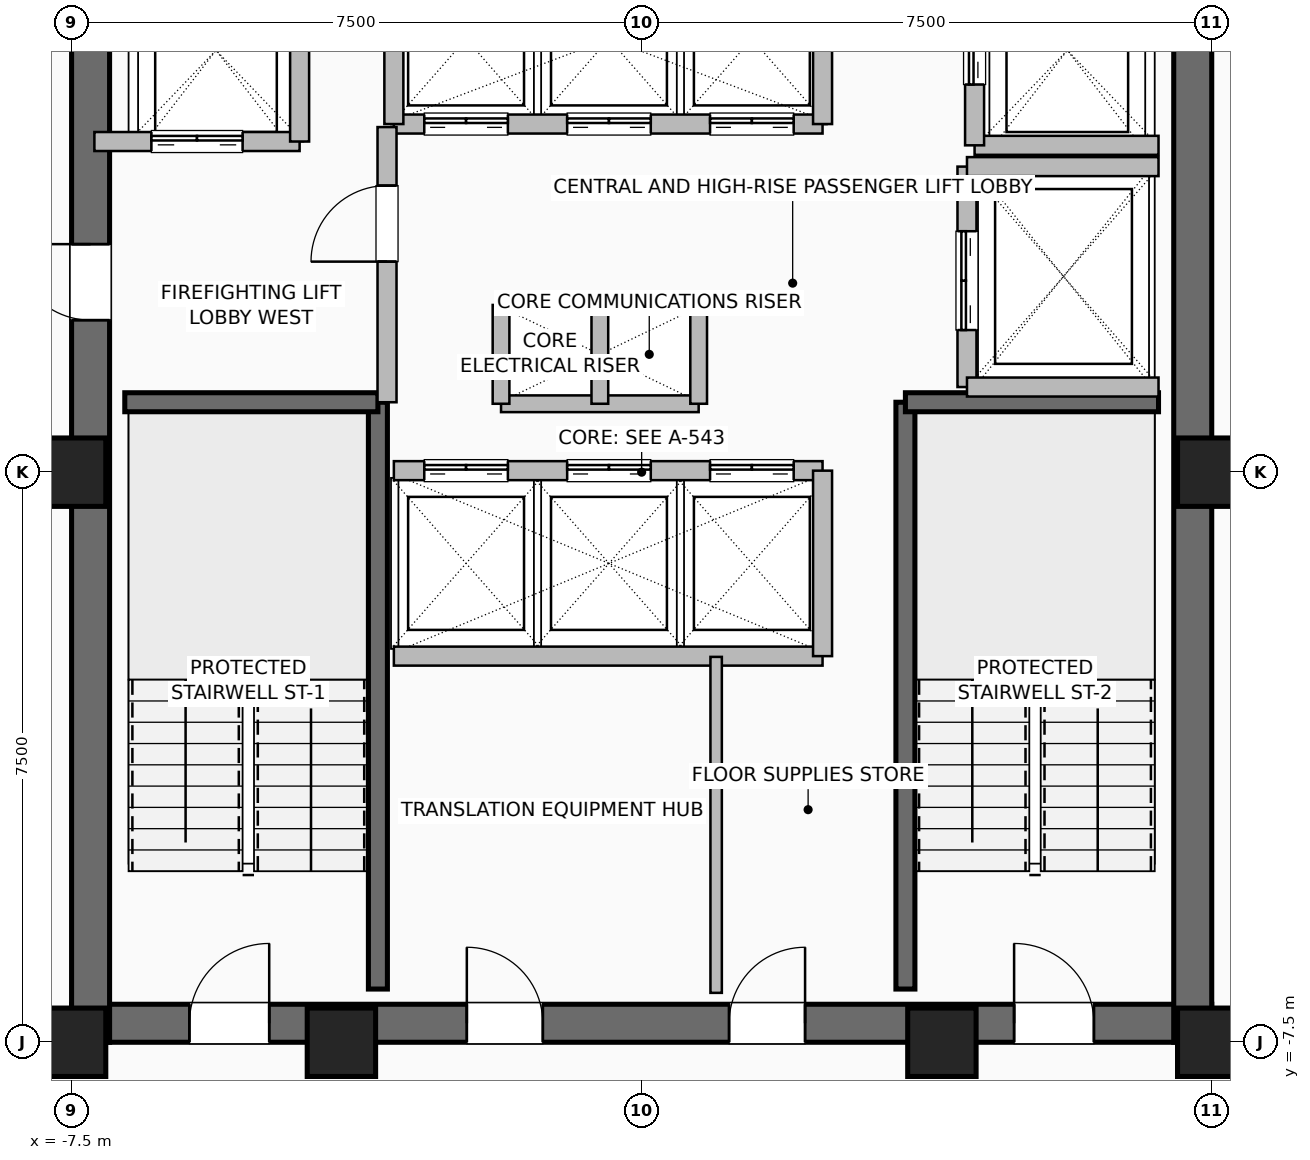
"""IFC4 building model, lengths in metres.
Left out: names, types, materials, properties, quantities, classifications, styles, units other than length and angle.
Written with IfcOpenShell. Run it as: python <this file> out.ifc"""

import sys

from ifc_helpers import new_model, si_unit, direction, frame, frame_2d, origin, origin_2d, place, context, subcontext, project, spatial, rectangle, hollow_rectangle, extrude, element, fill, save


model = new_model("IFC4")
c1 = context("Model", 3, precision=1e-05, world=origin(), true_north=direction((0.0, 1.0)))
c2 = subcontext(c1, "Body", "Model", "MODEL_VIEW")
j1 = project(units=[si_unit("LENGTHUNIT", "METRE"), si_unit("PLANEANGLEUNIT", "RADIAN")], contexts=[c1])
p1 = place(None, origin())
s1 = spatial("IfcSite", under=j1, at=p1, CompositionType="ELEMENT")
p2 = place(p1, origin())
s2 = spatial("IfcBuilding", under=s1, at=p2, CompositionType="ELEMENT")
p3 = place(p2, frame((0.0, 0.0, 166.2)))
s3 = spatial("IfcBuildingStorey", under=s2, at=p3, CompositionType="ELEMENT", Elevation=166.2)
for number, where, z_axis, x_axis in (
    (1, (-7.5, -7.5, 0.0), (0.0, 0.0, 1.0), (1.0, 0.0, 0.0)),
    (2, (-3.95, -7.5, 0.0), (0.0, 0.0, 1.0), (1.0, 0.0, 0.0)),
    (3, (3.95, -7.5, 0.0), (0.0, 0.0, 1.0), (1.0, 0.0, 0.0)),
    (4, (7.5, -7.5, 0.0), (0.0, 0.0, 1.0), (1.0, 0.0, 0.0)),
    (5, (7.5, 0.0, 0.0), (0.0, 0.0, 1.0), (1.0, 0.0, 0.0)),
    (6, (-7.5, 0.0, 0.0), (0.0, 0.0, 1.0), (1.0, 0.0, 0.0)),
):
    element("IfcColumn", number, at=place(p3, frame(where, z_axis=z_axis, x_axis=x_axis)), inside=s3, PredefinedType="COLUMN", context=c2, shape_type="SweptSolid", body=[
        extrude(hollow_rectangle(XDim=0.9, YDim=0.9, WallThickness=0.045, at=origin_2d()), origin(), (0.0, 0.0, 1.0), 3.6),
    ])
p4 = place(p3, frame((-7.5, -7.25, 0.0), z_axis=(0.0, 0.0, 1.0), x_axis=(1.0, 0.0, 0.0)))
e7 = element("IfcWall", 7, at=p4, inside=s3, PredefinedType="SHEAR", context=c2, shape_type="SweptSolid", body=[
    extrude(rectangle(XDim=15.0, YDim=0.5, at=frame_2d((7.5, 0.0))), origin(), (0.0, 0.0, 1.0), 3.36),
])
p5 = place(p4, frame((1.55, 0.0, 0.0)))
e8 = element("IfcOpeningElement", 8, at=p5, cuts=e7, PredefinedType="OPENING", context=c2, shape_type="SweptSolid", body=[
    extrude(rectangle(XDim=1.05, YDim=2.08, at=frame_2d((0.525, 1.04))), frame((0.0, 0.26, 0.0), z_axis=(0.0, -1.0, 0.0), x_axis=(1.0, 0.0, 0.0)), (0.0, 0.0, 1.0), 0.52),
])
p6 = place(p4, frame((12.4, 0.0, 0.0)))
e9 = element("IfcOpeningElement", 9, at=p6, cuts=e7, PredefinedType="OPENING", context=c2, shape_type="SweptSolid", body=[
    extrude(rectangle(XDim=1.05, YDim=2.08, at=frame_2d((0.525, 1.04))), frame((0.0, 0.26, 0.0), z_axis=(0.0, -1.0, 0.0), x_axis=(1.0, 0.0, 0.0)), (0.0, 0.0, 1.0), 0.52),
])
p7 = place(p4, frame((5.2, 0.0, 0.0)))
e10 = element("IfcOpeningElement", 10, at=p7, cuts=e7, PredefinedType="OPENING", context=c2, shape_type="SweptSolid", body=[
    extrude(rectangle(XDim=1.0, YDim=2.08, at=frame_2d((0.5, 1.04))), frame((0.0, 0.26, 0.0), z_axis=(0.0, -1.0, 0.0), x_axis=(1.0, 0.0, 0.0)), (0.0, 0.0, 1.0), 0.52),
])
p8 = place(p4, frame((8.65, 0.0, 0.0)))
e11 = element("IfcOpeningElement", 11, at=p8, cuts=e7, PredefinedType="OPENING", context=c2, shape_type="SweptSolid", body=[
    extrude(rectangle(XDim=1.0, YDim=2.08, at=frame_2d((0.5, 1.04))), frame((0.0, 0.26, 0.0), z_axis=(0.0, -1.0, 0.0), x_axis=(1.0, 0.0, 0.0)), (0.0, 0.0, 1.0), 0.52),
])
p9 = place(p3, frame((-7.25, -7.5, 0.0), z_axis=(0.0, 0.0, 1.0), x_axis=(0.0, 1.0, 0.0)))
e12 = element("IfcWall", 12, at=p9, inside=s3, PredefinedType="SHEAR", context=c2, shape_type="SweptSolid", body=[
    extrude(rectangle(XDim=15.0, YDim=0.5, at=frame_2d((7.5, 0.0))), origin(), (0.0, 0.0, 1.0), 3.36),
])
p10 = place(p9, frame((9.5, 0.0, 0.0)))
e13 = element("IfcOpeningElement", 13, at=p10, cuts=e12, PredefinedType="OPENING", context=c2, shape_type="SweptSolid", body=[
    extrude(rectangle(XDim=1.0, YDim=2.08, at=frame_2d((0.5, 1.04))), frame((0.0, 0.26, 0.0), z_axis=(0.0, -1.0, 0.0), x_axis=(1.0, 0.0, 0.0)), (0.0, 0.0, 1.0), 0.52),
])
p11 = place(p3, frame((7.25, -7.5, 0.0), z_axis=(0.0, 0.0, 1.0), x_axis=(0.0, 1.0, 0.0)))
e14 = element("IfcWall", 14, at=p11, inside=s3, PredefinedType="SHEAR", context=c2, shape_type="SweptSolid", body=[
    extrude(rectangle(XDim=15.0, YDim=0.5, at=frame_2d((7.5, 0.0))), origin(), (0.0, 0.0, 1.0), 3.36),
])
p12 = place(p3, frame((-3.47, -6.8, 0.0), z_axis=(0.0, 0.0, 1.0), x_axis=(0.0, 1.0, 0.0)))
e15 = element("IfcWall", 15, at=p12, inside=s3, PredefinedType="SHEAR", context=c2, shape_type="SweptSolid", body=[
    extrude(rectangle(XDim=7.72, YDim=0.25, at=frame_2d((3.86, 0.0))), origin(), (0.0, 0.0, 1.0), 3.36),
])
p13 = place(p3, frame((-6.8, 0.92, 0.0), z_axis=(0.0, 0.0, 1.0), x_axis=(1.0, 0.0, 0.0)))
e16 = element("IfcWall", 16, at=p13, inside=s3, PredefinedType="SHEAR", context=c2, shape_type="SweptSolid", body=[
    extrude(rectangle(XDim=3.33, YDim=0.25, at=frame_2d((1.665, 0.0))), origin(), (0.0, 0.0, 1.0), 3.36),
])
p14 = place(p3, frame((3.47, -6.8, 0.0), z_axis=(0.0, 0.0, 1.0), x_axis=(0.0, 1.0, 0.0)))
e17 = element("IfcWall", 17, at=p14, inside=s3, PredefinedType="SHEAR", context=c2, shape_type="SweptSolid", body=[
    extrude(rectangle(XDim=7.72, YDim=0.25, at=frame_2d((3.86, 0.0))), origin(), (0.0, 0.0, 1.0), 3.36),
])
p15 = place(p3, frame((3.47, 0.92, 0.0), z_axis=(0.0, 0.0, 1.0), x_axis=(1.0, 0.0, 0.0)))
e18 = element("IfcWall", 18, at=p15, inside=s3, PredefinedType="SHEAR", context=c2, shape_type="SweptSolid", body=[
    extrude(rectangle(XDim=3.33, YDim=0.25, at=frame_2d((1.665, 0.0))), origin(), (0.0, 0.0, 1.0), 3.36),
])
for number, where, z_axis, x_axis in (
    (19, (-1.85, 2.2, 0.0), (0.0, 0.0, 1.0), (1.0, 0.0, 0.0)),
    (20, (-1.85, 0.9, 0.0), (0.0, 0.0, 1.0), (1.0, 0.0, 0.0)),
):
    element("IfcWall", number, at=place(p3, frame(where, z_axis=z_axis, x_axis=x_axis)), inside=s3, PredefinedType="PARTITIONING", context=c2, shape_type="SweptSolid", body=[
        extrude(rectangle(XDim=2.6, YDim=0.22, at=frame_2d((1.3, 0.0))), origin(), (0.0, 0.0, 1.0), 3.36),
    ])
for number, where, z_axis, x_axis in (
    (21, (-0.55, 0.9, 0.0), (0.0, 0.0, 1.0), (0.0, 1.0, 0.0)),
    (22, (0.75, 0.9, 0.0), (0.0, 0.0, 1.0), (0.0, 1.0, 0.0)),
    (23, (-1.85, 0.9, 0.0), (0.0, 0.0, 1.0), (0.0, 1.0, 0.0)),
):
    element("IfcWall", number, at=place(p3, frame(where, z_axis=z_axis, x_axis=x_axis)), inside=s3, PredefinedType="PARTITIONING", context=c2, shape_type="SweptSolid", body=[
        extrude(rectangle(XDim=1.3, YDim=0.22, at=frame_2d((0.65, 0.0))), origin(), (0.0, 0.0, 1.0), 3.36),
    ])
p16 = place(p3, frame((-3.26, 0.02, 0.0), z_axis=(0.0, 0.0, 1.0), x_axis=(1.0, 0.0, 0.0)))
e24 = element("IfcWall", 24, at=p16, inside=s3, PredefinedType="SHEAR", context=c2, shape_type="SweptSolid", body=[
    extrude(rectangle(XDim=5.64, YDim=0.25, at=frame_2d((2.82, 0.0))), origin(), (0.0, 0.0, 1.0), 3.36),
])
p17 = place(p16, frame((0.4, 0.0, 0.0)))
e25 = element("IfcOpeningElement", 25, at=p17, cuts=e24, PredefinedType="OPENING", context=c2, shape_type="SweptSolid", body=[
    extrude(rectangle(XDim=1.1, YDim=2.2, at=frame_2d((0.55, 1.1))), frame((0.0, 0.135, 0.0), z_axis=(0.0, -1.0, 0.0), x_axis=(1.0, 0.0, 0.0)), (0.0, 0.0, 1.0), 0.27),
])
p18 = place(p16, frame((2.28, 0.0, 0.0)))
e26 = element("IfcOpeningElement", 26, at=p18, cuts=e24, PredefinedType="OPENING", context=c2, shape_type="SweptSolid", body=[
    extrude(rectangle(XDim=1.1, YDim=2.2, at=frame_2d((0.55, 1.1))), frame((0.0, 0.135, 0.0), z_axis=(0.0, -1.0, 0.0), x_axis=(1.0, 0.0, 0.0)), (0.0, 0.0, 1.0), 0.27),
])
p19 = place(p16, frame((4.16, 0.0, 0.0)))
e27 = element("IfcOpeningElement", 27, at=p19, cuts=e24, PredefinedType="OPENING", context=c2, shape_type="SweptSolid", body=[
    extrude(rectangle(XDim=1.1, YDim=2.2, at=frame_2d((0.55, 1.1))), frame((0.0, 0.135, 0.0), z_axis=(0.0, -1.0, 0.0), x_axis=(1.0, 0.0, 0.0)), (0.0, 0.0, 1.0), 0.27),
])
p20 = place(p3, frame((-3.26, -2.42, 0.0), z_axis=(0.0, 0.0, 1.0), x_axis=(1.0, 0.0, 0.0)))
e28 = element("IfcWall", 28, at=p20, inside=s3, PredefinedType="SHEAR", context=c2, shape_type="SweptSolid", body=[
    extrude(rectangle(XDim=5.64, YDim=0.25, at=frame_2d((2.82, 0.0))), origin(), (0.0, 0.0, 1.0), 3.36),
])
p21 = place(p3, frame((2.38, -2.42, 0.0), z_axis=(0.0, 0.0, 1.0), x_axis=(0.0, 1.0, 0.0)))
e29 = element("IfcWall", 29, at=p21, inside=s3, PredefinedType="SHEAR", context=c2, shape_type="SweptSolid", body=[
    extrude(rectangle(XDim=2.44, YDim=0.25, at=frame_2d((1.22, 0.0))), origin(), (0.0, 0.0, 1.0), 3.36),
])
p22 = place(p3, frame((-3.26, 4.58, 0.0), z_axis=(0.0, 0.0, 1.0), x_axis=(1.0, 0.0, 0.0)))
e30 = element("IfcWall", 30, at=p22, inside=s3, PredefinedType="SHEAR", context=c2, shape_type="SweptSolid", body=[
    extrude(rectangle(XDim=5.64, YDim=0.25, at=frame_2d((2.82, 0.0))), origin(), (0.0, 0.0, 1.0), 3.36),
])
p23 = place(p22, frame((0.4, 0.0, 0.0)))
e31 = element("IfcOpeningElement", 31, at=p23, cuts=e30, PredefinedType="OPENING", context=c2, shape_type="SweptSolid", body=[
    extrude(rectangle(XDim=1.1, YDim=2.2, at=frame_2d((0.55, 1.1))), frame((0.0, 0.135, 0.0), z_axis=(0.0, -1.0, 0.0), x_axis=(1.0, 0.0, 0.0)), (0.0, 0.0, 1.0), 0.27),
])
p24 = place(p22, frame((2.28, 0.0, 0.0)))
e32 = element("IfcOpeningElement", 32, at=p24, cuts=e30, PredefinedType="OPENING", context=c2, shape_type="SweptSolid", body=[
    extrude(rectangle(XDim=1.1, YDim=2.2, at=frame_2d((0.55, 1.1))), frame((0.0, 0.135, 0.0), z_axis=(0.0, -1.0, 0.0), x_axis=(1.0, 0.0, 0.0)), (0.0, 0.0, 1.0), 0.27),
])
p25 = place(p22, frame((4.16, 0.0, 0.0)))
e33 = element("IfcOpeningElement", 33, at=p25, cuts=e30, PredefinedType="OPENING", context=c2, shape_type="SweptSolid", body=[
    extrude(rectangle(XDim=1.1, YDim=2.2, at=frame_2d((0.55, 1.1))), frame((0.0, 0.135, 0.0), z_axis=(0.0, -1.0, 0.0), x_axis=(1.0, 0.0, 0.0)), (0.0, 0.0, 1.0), 0.27),
])
for number, where, z_axis, x_axis in (
    (34, (-3.26, 4.58, 0.0), (0.0, 0.0, 1.0), (0.0, 1.0, 0.0)),
    (35, (2.38, 4.58, 0.0), (0.0, 0.0, 1.0), (0.0, 1.0, 0.0)),
):
    element("IfcWall", number, at=place(p3, frame(where, z_axis=z_axis, x_axis=x_axis)), inside=s3, PredefinedType="SHEAR", context=c2, shape_type="SweptSolid", body=[
        extrude(rectangle(XDim=2.22, YDim=0.25, at=frame_2d((1.11, 0.0))), origin(), (0.0, 0.0, 1.0), 3.36),
    ])
p26 = place(p3, frame((-7.2, 4.35, 0.0), z_axis=(0.0, 0.0, 1.0), x_axis=(1.0, 0.0, 0.0)))
e36 = element("IfcWall", 36, at=p26, inside=s3, PredefinedType="SHEAR", context=c2, shape_type="SweptSolid", body=[
    extrude(rectangle(XDim=2.7, YDim=0.25, at=frame_2d((1.35, 0.0))), origin(), (0.0, 0.0, 1.0), 3.36),
])
p27 = place(p26, frame((0.75, 0.0, 0.0)))
e37 = element("IfcOpeningElement", 37, at=p27, cuts=e36, PredefinedType="OPENING", context=c2, shape_type="SweptSolid", body=[
    extrude(rectangle(XDim=1.2, YDim=2.2, at=frame_2d((0.6, 1.1))), frame((0.0, 0.135, 0.0), z_axis=(0.0, -1.0, 0.0), x_axis=(1.0, 0.0, 0.0)), (0.0, 0.0, 1.0), 0.27),
])
p28 = place(p3, frame((-4.5, 4.35, 0.0), z_axis=(0.0, 0.0, 1.0), x_axis=(0.0, 1.0, 0.0)))
e38 = element("IfcWall", 38, at=p28, inside=s3, PredefinedType="SHEAR", context=c2, shape_type="SweptSolid", body=[
    extrude(rectangle(XDim=2.85, YDim=0.25, at=frame_2d((1.425, 0.0))), origin(), (0.0, 0.0, 1.0), 3.36),
])
p29 = place(p3, frame((4.38, 4.3, 0.0), z_axis=(0.0, 0.0, 1.0), x_axis=(1.0, 0.0, 0.0)))
e39 = element("IfcWall", 39, at=p29, inside=s3, PredefinedType="SHEAR", context=c2, shape_type="SweptSolid", body=[
    extrude(rectangle(XDim=2.42, YDim=0.25, at=frame_2d((1.21, 0.0))), origin(), (0.0, 0.0, 1.0), 3.36),
])
p30 = place(p3, frame((4.38, 4.3, 0.0), z_axis=(0.0, 0.0, 1.0), x_axis=(0.0, 1.0, 0.0)))
e40 = element("IfcWall", 40, at=p30, inside=s3, PredefinedType="SHEAR", context=c2, shape_type="SweptSolid", body=[
    extrude(rectangle(XDim=2.5, YDim=0.25, at=frame_2d((1.25, 0.0))), origin(), (0.0, 0.0, 1.0), 3.36),
])
p31 = place(p30, frame((0.8, 0.0, 0.0)))
e41 = element("IfcOpeningElement", 41, at=p31, cuts=e40, PredefinedType="OPENING", context=c2, shape_type="SweptSolid", body=[
    extrude(rectangle(XDim=1.2, YDim=2.2, at=frame_2d((0.6, 1.1))), frame((0.0, 0.135, 0.0), z_axis=(0.0, -1.0, 0.0), x_axis=(1.0, 0.0, 0.0)), (0.0, 0.0, 1.0), 0.27),
])
p32 = place(p3, frame((4.28, 1.12, 0.0), z_axis=(0.0, 0.0, 1.0), x_axis=(0.0, 1.0, 0.0)))
e42 = element("IfcWall", 42, at=p32, inside=s3, PredefinedType="SHEAR", context=c2, shape_type="SweptSolid", body=[
    extrude(rectangle(XDim=2.9, YDim=0.25, at=frame_2d((1.45, 0.0))), origin(), (0.0, 0.0, 1.0), 3.36),
])
p33 = place(p32, frame((0.75, 0.0, 0.0)))
e43 = element("IfcOpeningElement", 43, at=p33, cuts=e42, PredefinedType="OPENING", context=c2, shape_type="SweptSolid", body=[
    extrude(rectangle(XDim=1.3, YDim=2.3, at=frame_2d((0.65, 1.15))), frame((0.0, 0.135, 0.0), z_axis=(0.0, -1.0, 0.0), x_axis=(1.0, 0.0, 0.0)), (0.0, 0.0, 1.0), 0.27),
])
for number, where, z_axis, x_axis in (
    (44, (4.28, 1.12, 0.0), (0.0, 0.0, 1.0), (1.0, 0.0, 0.0)),
    (45, (4.28, 4.02, 0.0), (0.0, 0.0, 1.0), (1.0, 0.0, 0.0)),
):
    element("IfcWall", number, at=place(p3, frame(where, z_axis=z_axis, x_axis=x_axis)), inside=s3, PredefinedType="SHEAR", context=c2, shape_type="SweptSolid", body=[
        extrude(rectangle(XDim=2.52, YDim=0.25, at=frame_2d((1.26, 0.0))), origin(), (0.0, 0.0, 1.0), 3.36),
    ])
p34 = place(p3, frame((-3.35, 0.92, 0.0), z_axis=(0.0, 0.0, 1.0), x_axis=(0.0, 1.0, 0.0)))
e46 = element("IfcWall", 46, at=p34, inside=s3, PredefinedType="SHEAR", context=c2, shape_type="SweptSolid", body=[
    extrude(rectangle(XDim=3.62, YDim=0.25, at=frame_2d((1.81, 0.0))), origin(), (0.0, 0.0, 1.0), 3.36),
])
p35 = place(p34, frame((1.85, 0.0, 0.0)))
e47 = element("IfcOpeningElement", 47, at=p35, cuts=e46, PredefinedType="OPENING", context=c2, shape_type="SweptSolid", body=[
    extrude(rectangle(XDim=1.0, YDim=2.08, at=frame_2d((0.5, 1.04))), frame((0.0, 0.135, 0.0), z_axis=(0.0, -1.0, 0.0), x_axis=(1.0, 0.0, 0.0)), (0.0, 0.0, 1.0), 0.27),
])
p36 = place(p3, frame((0.98, -6.85, 0.0), z_axis=(0.0, 0.0, 1.0), x_axis=(0.0, 1.0, 0.0)))
e48 = element("IfcWall", 48, at=p36, inside=s3, PredefinedType="PARTITIONING", context=c2, shape_type="SweptSolid", body=[
    extrude(rectangle(XDim=4.42, YDim=0.15, at=frame_2d((2.21, 0.0))), origin(), (0.0, 0.0, 1.0), 3.36),
])
p37 = place(p3, frame((7.45, -7.48, 0.0), z_axis=(0.0, 0.0, 1.0), x_axis=(1.0, 0.0, 0.0)))
e49 = element("IfcWall", 49, at=p37, inside=s3, PredefinedType="PARTITIONING", context=c2, shape_type="SweptSolid", body=[
    extrude(rectangle(XDim=0.95, YDim=0.15, at=frame_2d((0.475, 0.0))), origin(), (0.0, 0.0, 1.0), 3.36),
])
p38 = place(p5, origin())
e50 = element("IfcDoor", 50, at=p38, inside=s3, OperationType="SINGLE_SWING_RIGHT", PredefinedType="DOOR", context=c2, shape_type="SweptSolid", body=[
    extrude(rectangle(XDim=1.05, YDim=2.08, at=frame_2d((0.525, 1.04))), frame((0.0, 0.025, 0.0), z_axis=(0.0, -1.0, 0.0), x_axis=(1.0, 0.0, 0.0)), (0.0, 0.0, 1.0), 0.05),
])
fill(e8, e50)
p39 = place(p6, origin())
e51 = element("IfcDoor", 51, at=p39, inside=s3, OperationType="SINGLE_SWING_LEFT", PredefinedType="DOOR", context=c2, shape_type="SweptSolid", body=[
    extrude(rectangle(XDim=1.05, YDim=2.08, at=frame_2d((0.525, 1.04))), frame((0.0, 0.025, 0.0), z_axis=(0.0, -1.0, 0.0), x_axis=(1.0, 0.0, 0.0)), (0.0, 0.0, 1.0), 0.05),
])
fill(e9, e51)
p40 = place(p10, origin())
e52 = element("IfcDoor", 52, at=p40, inside=s3, OperationType="SINGLE_SWING_RIGHT", PredefinedType="DOOR", context=c2, shape_type="SweptSolid", body=[
    extrude(rectangle(XDim=1.0, YDim=2.08, at=frame_2d((0.5, 1.04))), frame((0.0, 0.025, 0.0), z_axis=(0.0, -1.0, 0.0), x_axis=(1.0, 0.0, 0.0)), (0.0, 0.0, 1.0), 0.05),
])
fill(e13, e52)
p41 = place(p7, origin())
e53 = element("IfcDoor", 53, at=p41, inside=s3, OperationType="SINGLE_SWING_LEFT", PredefinedType="DOOR", context=c2, shape_type="SweptSolid", body=[
    extrude(rectangle(XDim=1.0, YDim=2.08, at=frame_2d((0.5, 1.04))), frame((0.0, 0.025, 0.0), z_axis=(0.0, -1.0, 0.0), x_axis=(1.0, 0.0, 0.0)), (0.0, 0.0, 1.0), 0.05),
])
fill(e10, e53)
p42 = place(p8, origin())
e54 = element("IfcDoor", 54, at=p42, inside=s3, OperationType="SINGLE_SWING_RIGHT", PredefinedType="DOOR", context=c2, shape_type="SweptSolid", body=[
    extrude(rectangle(XDim=1.0, YDim=2.08, at=frame_2d((0.5, 1.04))), frame((0.0, 0.025, 0.0), z_axis=(0.0, -1.0, 0.0), x_axis=(1.0, 0.0, 0.0)), (0.0, 0.0, 1.0), 0.05),
])
fill(e11, e54)
p43 = place(p17, origin())
e55 = element("IfcDoor", 55, at=p43, inside=s3, OperationType="DOUBLE_DOOR_SLIDING", PredefinedType="DOOR", context=c2, shape_type="SweptSolid", body=[
    extrude(rectangle(XDim=1.1, YDim=2.2, at=frame_2d((0.55, 1.1))), frame((0.0, 0.025, 0.0), z_axis=(0.0, -1.0, 0.0), x_axis=(1.0, 0.0, 0.0)), (0.0, 0.0, 1.0), 0.05),
])
fill(e25, e55)
p44 = place(p18, origin())
e56 = element("IfcDoor", 56, at=p44, inside=s3, OperationType="DOUBLE_DOOR_SLIDING", PredefinedType="DOOR", context=c2, shape_type="SweptSolid", body=[
    extrude(rectangle(XDim=1.1, YDim=2.2, at=frame_2d((0.55, 1.1))), frame((0.0, 0.025, 0.0), z_axis=(0.0, -1.0, 0.0), x_axis=(1.0, 0.0, 0.0)), (0.0, 0.0, 1.0), 0.05),
])
fill(e26, e56)
p45 = place(p19, origin())
e57 = element("IfcDoor", 57, at=p45, inside=s3, OperationType="DOUBLE_DOOR_SLIDING", PredefinedType="DOOR", context=c2, shape_type="SweptSolid", body=[
    extrude(rectangle(XDim=1.1, YDim=2.2, at=frame_2d((0.55, 1.1))), frame((0.0, 0.025, 0.0), z_axis=(0.0, -1.0, 0.0), x_axis=(1.0, 0.0, 0.0)), (0.0, 0.0, 1.0), 0.05),
])
fill(e27, e57)
p46 = place(p23, origin())
e58 = element("IfcDoor", 58, at=p46, inside=s3, OperationType="DOUBLE_DOOR_SLIDING", PredefinedType="DOOR", context=c2, shape_type="SweptSolid", body=[
    extrude(rectangle(XDim=1.1, YDim=2.2, at=frame_2d((0.55, 1.1))), frame((0.0, 0.025, 0.0), z_axis=(0.0, -1.0, 0.0), x_axis=(1.0, 0.0, 0.0)), (0.0, 0.0, 1.0), 0.05),
])
fill(e31, e58)
p47 = place(p24, origin())
e59 = element("IfcDoor", 59, at=p47, inside=s3, OperationType="DOUBLE_DOOR_SLIDING", PredefinedType="DOOR", context=c2, shape_type="SweptSolid", body=[
    extrude(rectangle(XDim=1.1, YDim=2.2, at=frame_2d((0.55, 1.1))), frame((0.0, 0.025, 0.0), z_axis=(0.0, -1.0, 0.0), x_axis=(1.0, 0.0, 0.0)), (0.0, 0.0, 1.0), 0.05),
])
fill(e32, e59)
p48 = place(p25, origin())
e60 = element("IfcDoor", 60, at=p48, inside=s3, OperationType="DOUBLE_DOOR_SLIDING", PredefinedType="DOOR", context=c2, shape_type="SweptSolid", body=[
    extrude(rectangle(XDim=1.1, YDim=2.2, at=frame_2d((0.55, 1.1))), frame((0.0, 0.025, 0.0), z_axis=(0.0, -1.0, 0.0), x_axis=(1.0, 0.0, 0.0)), (0.0, 0.0, 1.0), 0.05),
])
fill(e33, e60)
p49 = place(p27, origin())
e61 = element("IfcDoor", 61, at=p49, inside=s3, OperationType="DOUBLE_DOOR_SLIDING", PredefinedType="DOOR", context=c2, shape_type="SweptSolid", body=[
    extrude(rectangle(XDim=1.2, YDim=2.2, at=frame_2d((0.6, 1.1))), frame((0.0, 0.025, 0.0), z_axis=(0.0, -1.0, 0.0), x_axis=(1.0, 0.0, 0.0)), (0.0, 0.0, 1.0), 0.05),
])
fill(e37, e61)
p50 = place(p31, origin())
e62 = element("IfcDoor", 62, at=p50, inside=s3, OperationType="DOUBLE_DOOR_SLIDING", PredefinedType="DOOR", context=c2, shape_type="SweptSolid", body=[
    extrude(rectangle(XDim=1.2, YDim=2.2, at=frame_2d((0.6, 1.1))), frame((0.0, 0.025, 0.0), z_axis=(0.0, -1.0, 0.0), x_axis=(1.0, 0.0, 0.0)), (0.0, 0.0, 1.0), 0.05),
])
fill(e41, e62)
p51 = place(p33, origin())
e63 = element("IfcDoor", 63, at=p51, inside=s3, OperationType="DOUBLE_DOOR_SLIDING", PredefinedType="DOOR", context=c2, shape_type="SweptSolid", body=[
    extrude(rectangle(XDim=1.3, YDim=2.3, at=frame_2d((0.65, 1.15))), frame((0.0, 0.025, 0.0), z_axis=(0.0, -1.0, 0.0), x_axis=(1.0, 0.0, 0.0)), (0.0, 0.0, 1.0), 0.05),
])
fill(e43, e63)
p52 = place(p35, origin())
e64 = element("IfcDoor", 64, at=p52, inside=s3, OperationType="SINGLE_SWING_LEFT", PredefinedType="DOOR", context=c2, shape_type="SweptSolid", body=[
    extrude(rectangle(XDim=1.0, YDim=2.08, at=frame_2d((0.5, 1.04))), frame((0.0, 0.025, 0.0), z_axis=(0.0, -1.0, 0.0), x_axis=(1.0, 0.0, 0.0)), (0.0, 0.0, 1.0), 0.05),
])
fill(e47, e64)
save(model, sys.argv[1])
